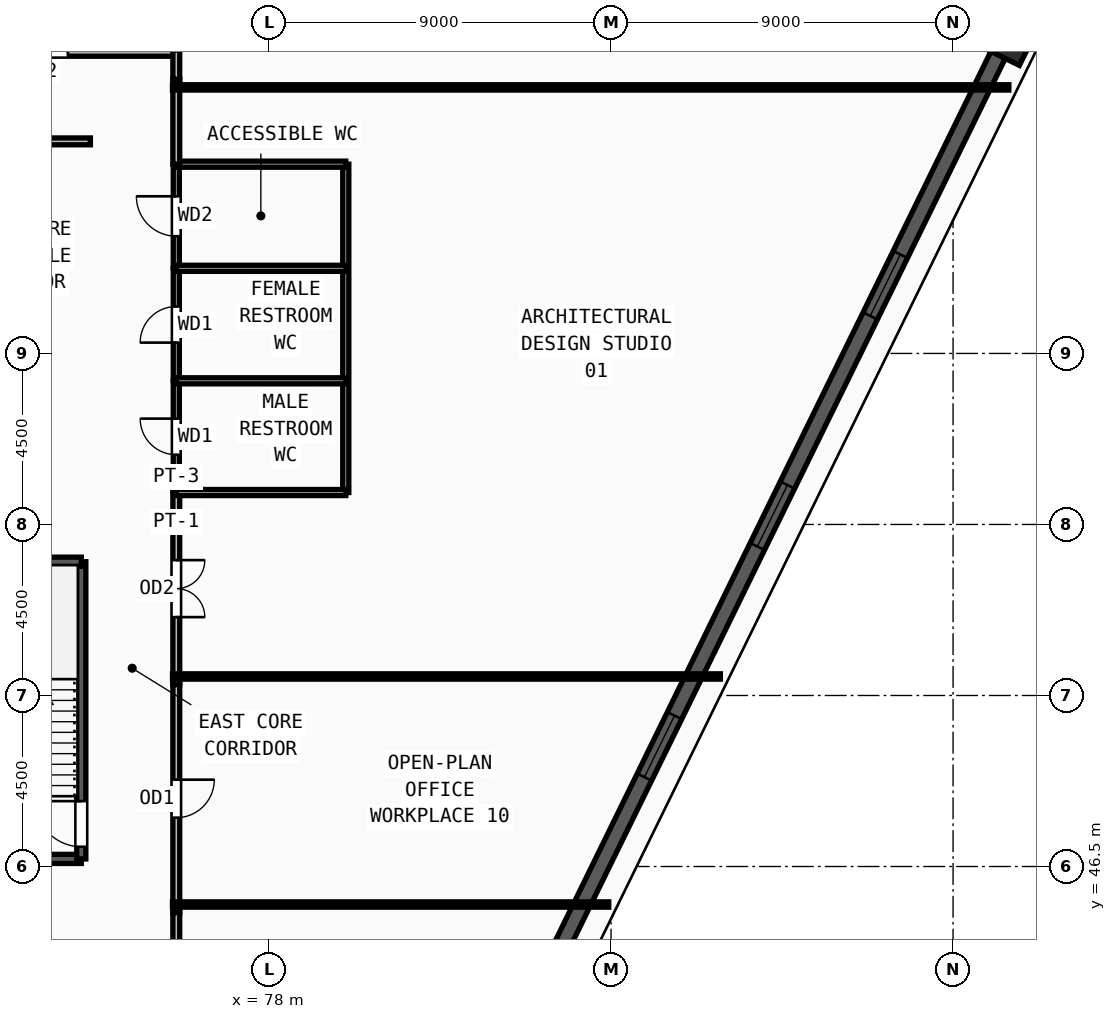
"""IFC4 building model, lengths in metres.
Left out: names, types, materials, properties, quantities, classifications, styles, units other than length and angle.
Written with IfcOpenShell. Run it as: python <this file> out.ifc"""

import sys

from ifc_helpers import new_model, si_unit, direction, frame, frame_2d, origin, origin_2d, place, context, subcontext, project, spatial, rectangle, extrude, source, transform, mapped, element, fill, save


model = new_model("IFC4")
c1 = context("Model", 3, precision=1e-05, world=origin(), true_north=direction((0.0, 1.0)))
c2 = subcontext(c1, "Body", "Model", "MODEL_VIEW")
j1 = project(units=[si_unit("LENGTHUNIT", "METRE"), si_unit("PLANEANGLEUNIT", "RADIAN")], contexts=[c1])
p1 = place(None, origin())
s1 = spatial("IfcSite", under=j1, at=p1, CompositionType="ELEMENT")
p2 = place(p1, origin())
s2 = spatial("IfcBuilding", under=s1, at=p2, CompositionType="ELEMENT")
p3 = place(p2, frame((0.0, 0.0, 85.5)))
s3 = spatial("IfcBuildingStorey", under=s2, at=p3, CompositionType="ELEMENT", Elevation=85.5)
m1 = source(origin(), c2, "Body", "SweptSolid", [
    extrude(rectangle(XDim=1.55, YDim=1.25, at=origin_2d()), origin(), (0.0, 0.0, 1.0), 3.75),
])
p4 = place(p3, frame((97.525, 68.55, 0.0), z_axis=(0.0, 0.0, 1.0), x_axis=(0.439782427776, 0.898104345953, 0.0)))
e1 = element("IfcColumn", 1, at=p4, inside=s3, PredefinedType="COLUMN", context=c2, shape_type="MappedRepresentation", body=[
    mapped(m1, transform((0.0, 0.0, 0.0), x_axis=(1.0, 0.0, 0.0), y_axis=(0.0, 1.0, 0.0), z_axis=(0.0, 0.0, 1.0), scale=1.0)),
])
p5 = place(p3, frame((85.303, 43.594, 0.0), z_axis=(0.0, 0.0, 1.0), x_axis=(0.43984083091, 0.898075744837, 0.0)))
e2 = element("IfcWall", 2, at=p5, inside=s3, PredefinedType="SOLIDWALL", context=c2, shape_type="SweptSolid", body=[
    extrude(rectangle(XDim=27.023, YDim=0.42, at=frame_2d((13.512, 0.0))), origin(), (0.0, 0.0, 1.0), 3.57),
])
m2 = source(origin(), c2, "Body", "SweptSolid", [
    extrude(rectangle(XDim=1.8, YDim=1.95, at=frame_2d((0.9, 0.975))), frame((0.0, 0.22, 0.0), z_axis=(0.0, -1.0, 0.0), x_axis=(1.0, 0.0, 0.0)), (0.0, 0.0, 1.0), 0.44),
])
p6 = place(p5, frame((5.856, 0.0, 0.55)))
e3 = element("IfcOpeningElement", 3, at=p6, cuts=e2, PredefinedType="OPENING", context=c2, shape_type="MappedRepresentation", body=[
    mapped(m2, transform((0.0, 0.0, 0.0), x_axis=(1.0, 0.0, 0.0), y_axis=(0.0, 1.0, 0.0), z_axis=(0.0, 0.0, 1.0), scale=1.0)),
])
p7 = place(p5, frame((12.612, 0.0, 0.55)))
e4 = element("IfcOpeningElement", 4, at=p7, cuts=e2, PredefinedType="OPENING", context=c2, shape_type="MappedRepresentation", body=[
    mapped(m2, transform((0.0, 0.0, 0.0), x_axis=(1.0, 0.0, 0.0), y_axis=(0.0, 1.0, 0.0), z_axis=(0.0, 0.0, 1.0), scale=1.0)),
])
p8 = place(p5, frame((19.368, 0.0, 0.55)))
e5 = element("IfcOpeningElement", 5, at=p8, cuts=e2, PredefinedType="OPENING", context=c2, shape_type="MappedRepresentation", body=[
    mapped(m2, transform((0.0, 0.0, 0.0), x_axis=(1.0, 0.0, 0.0), y_axis=(0.0, 1.0, 0.0), z_axis=(0.0, 0.0, 1.0), scale=1.0)),
])
p9 = place(p3, frame((69.62, 46.7, 0.0), z_axis=(0.0, 0.0, 1.0), x_axis=(1.0, 0.0, 0.0)))
e6 = element("IfcWall", 6, at=p9, inside=s3, PredefinedType="SOLIDWALL", context=c2, shape_type="SweptSolid", body=[
    extrude(rectangle(XDim=3.44, YDim=0.24, at=frame_2d((1.72, 0.0))), origin(), (0.0, 0.0, 1.0), 3.57),
])
p10 = place(p3, frame((73.06, 46.7, 0.0), z_axis=(0.0, 0.0, 1.0), x_axis=(0.0, 1.0, 0.0)))
e7 = element("IfcWall", 7, at=p10, inside=s3, PredefinedType="SOLIDWALL", context=c2, shape_type="SweptSolid", body=[
    extrude(rectangle(XDim=7.82, YDim=0.24, at=frame_2d((3.91, 0.0))), origin(), (0.0, 0.0, 1.0), 3.57),
])
m3 = source(origin(), c2, "Body", "SweptSolid", [
    extrude(rectangle(XDim=1.2, YDim=2.2, at=frame_2d((0.6, 1.1))), frame((0.0, 0.13, 0.0), z_axis=(0.0, -1.0, 0.0), x_axis=(1.0, 0.0, 0.0)), (0.0, 0.0, 1.0), 0.26),
])
p11 = place(p10, frame((0.32, 0.0, 0.0)))
e8 = element("IfcOpeningElement", 8, at=p11, cuts=e7, PredefinedType="OPENING", context=c2, shape_type="MappedRepresentation", body=[
    mapped(m3, transform((0.0, 0.0, 0.0), x_axis=(1.0, 0.0, 0.0), y_axis=(0.0, 1.0, 0.0), z_axis=(0.0, 0.0, 1.0), scale=1.0)),
])
p12 = place(p3, frame((73.06, 54.52, 0.0), z_axis=(0.0, 0.0, 1.0), x_axis=(-1.0, 0.0, 0.0)))
e9 = element("IfcWall", 9, at=p12, inside=s3, PredefinedType="SOLIDWALL", context=c2, shape_type="SweptSolid", body=[
    extrude(rectangle(XDim=3.44, YDim=0.24, at=frame_2d((1.72, 0.0))), origin(), (0.0, 0.0, 1.0), 3.57),
])
p13 = place(p3, frame((75.56, 56.34, 0.0), z_axis=(0.0, 0.0, 1.0), x_axis=(0.0, 1.0, 0.0)))
e10 = element("IfcWall", 10, at=p13, inside=s3, PredefinedType="PARTITIONING", context=c2, shape_type="SweptSolid", body=[
    extrude(rectangle(XDim=2.94, YDim=0.16, at=frame_2d((1.47, 0.0))), origin(), (0.0, 0.0, 1.0), 3.57),
])
m4 = source(origin(), c2, "Body", "SweptSolid", [
    extrude(rectangle(XDim=0.95, YDim=2.15, at=frame_2d((0.475, 1.075))), frame((0.0, 0.09, 0.0), z_axis=(0.0, -1.0, 0.0), x_axis=(1.0, 0.0, 0.0)), (0.0, 0.0, 1.0), 0.18),
])
p14 = place(p13, frame((0.995, 0.0, 0.0)))
e11 = element("IfcOpeningElement", 11, at=p14, cuts=e10, PredefinedType="OPENING", context=c2, shape_type="MappedRepresentation", body=[
    mapped(m4, transform((0.0, 0.0, 0.0), x_axis=(1.0, 0.0, 0.0), y_axis=(0.0, 1.0, 0.0), z_axis=(0.0, 0.0, 1.0), scale=1.0)),
])
p15 = place(p3, frame((75.56, 59.28, 0.0), z_axis=(0.0, 0.0, 1.0), x_axis=(0.0, 1.0, 0.0)))
e12 = element("IfcWall", 12, at=p15, inside=s3, PredefinedType="PARTITIONING", context=c2, shape_type="SweptSolid", body=[
    extrude(rectangle(XDim=2.96, YDim=0.16, at=frame_2d((1.48, 0.0))), origin(), (0.0, 0.0, 1.0), 3.57),
])
p16 = place(p15, frame((1.005, 0.0, 0.0)))
e13 = element("IfcOpeningElement", 13, at=p16, cuts=e12, PredefinedType="OPENING", context=c2, shape_type="MappedRepresentation", body=[
    mapped(m4, transform((0.0, 0.0, 0.0), x_axis=(1.0, 0.0, 0.0), y_axis=(0.0, 1.0, 0.0), z_axis=(0.0, 0.0, 1.0), scale=1.0)),
])
p17 = place(p3, frame((75.56, 62.24, 0.0), z_axis=(0.0, 0.0, 1.0), x_axis=(0.0, 1.0, 0.0)))
e14 = element("IfcWall", 14, at=p17, inside=s3, PredefinedType="PARTITIONING", context=c2, shape_type="SweptSolid", body=[
    extrude(rectangle(XDim=2.74, YDim=0.16, at=frame_2d((1.37, 0.0))), origin(), (0.0, 0.0, 1.0), 3.57),
])
m5 = source(origin(), c2, "Body", "SweptSolid", [
    extrude(rectangle(XDim=1.05, YDim=2.15, at=frame_2d((0.525, 1.075))), frame((0.0, 0.09, 0.0), z_axis=(0.0, -1.0, 0.0), x_axis=(1.0, 0.0, 0.0)), (0.0, 0.0, 1.0), 0.18),
])
p18 = place(p17, frame((0.845, 0.0, 0.0)))
e15 = element("IfcOpeningElement", 15, at=p18, cuts=e14, PredefinedType="OPENING", context=c2, shape_type="MappedRepresentation", body=[
    mapped(m5, transform((0.0, 0.0, 0.0), x_axis=(1.0, 0.0, 0.0), y_axis=(0.0, 1.0, 0.0), z_axis=(0.0, 0.0, 1.0), scale=1.0)),
])
p19 = place(p3, frame((69.46, 65.58, 0.0), z_axis=(0.0, 0.0, 1.0), x_axis=(1.0, 0.0, 0.0)))
e16 = element("IfcWall", 16, at=p19, inside=s3, PredefinedType="PARTITIONING", context=c2, shape_type="SweptSolid", body=[
    extrude(rectangle(XDim=3.84, YDim=0.18, at=frame_2d((1.92, 0.0))), origin(), (0.0, 0.0, 1.0), 3.57),
])
m6 = source(origin(), c2, "Body", "SweptSolid", [
    extrude(rectangle(XDim=1.3, YDim=2.2, at=frame_2d((0.65, 1.1))), frame((0.0, 0.1, 0.0), z_axis=(0.0, -1.0, 0.0), x_axis=(1.0, 0.0, 0.0)), (0.0, 0.0, 1.0), 0.2),
])
p20 = place(p19, frame((1.27, 0.0, 0.0)))
e17 = element("IfcOpeningElement", 17, at=p20, cuts=e16, PredefinedType="OPENING", context=c2, shape_type="MappedRepresentation", body=[
    mapped(m6, transform((0.0, 0.0, 0.0), x_axis=(1.0, 0.0, 0.0), y_axis=(0.0, 1.0, 0.0), z_axis=(0.0, 0.0, 1.0), scale=1.0)),
])
p21 = place(p3, frame((75.56, 56.34, 0.0), z_axis=(0.0, 0.0, 1.0), x_axis=(0.0, -1.0, 0.0)))
e18 = element("IfcWall", 18, at=p21, inside=s3, PredefinedType="PARTITIONING", context=c2, shape_type="SweptSolid", body=[
    extrude(rectangle(XDim=5.055, YDim=0.18, at=frame_2d((2.528, 0.0))), origin(), (0.0, 0.0, 1.0), 3.57),
])
m7 = source(origin(), c2, "Body", "SweptSolid", [
    extrude(rectangle(XDim=1.5, YDim=2.2, at=frame_2d((0.75, 1.1))), frame((0.0, 0.1, 0.0), z_axis=(0.0, -1.0, 0.0), x_axis=(1.0, 0.0, 0.0)), (0.0, 0.0, 1.0), 0.2),
])
p22 = place(p21, frame((1.778, 0.0, 0.0)))
e19 = element("IfcOpeningElement", 19, at=p22, cuts=e18, PredefinedType="OPENING", context=c2, shape_type="MappedRepresentation", body=[
    mapped(m7, transform((0.0, 0.0, 0.0), x_axis=(1.0, 0.0, 0.0), y_axis=(0.0, 1.0, 0.0), z_axis=(0.0, 0.0, 1.0), scale=1.0)),
])
p23 = place(p3, frame((68.285, 67.91, 0.0), z_axis=(0.0, 0.0, 1.0), x_axis=(1.0, 0.0, 0.0)))
e20 = element("IfcWall", 20, at=p23, inside=s3, PredefinedType="PARTITIONING", context=c2, shape_type="SweptSolid", body=[
    extrude(rectangle(XDim=7.345, YDim=0.18, at=frame_2d((3.672, 0.0))), origin(), (0.0, 0.0, 1.0), 3.57),
])
p24 = place(p23, frame((2.922, 0.0, 0.0)))
e21 = element("IfcOpeningElement", 21, at=p24, cuts=e20, PredefinedType="OPENING", context=c2, shape_type="MappedRepresentation", body=[
    mapped(m7, transform((0.0, 0.0, 0.0), x_axis=(1.0, 0.0, 0.0), y_axis=(0.0, 1.0, 0.0), z_axis=(0.0, 0.0, 1.0), scale=1.0)),
])
p25 = place(p3, frame((75.56, 51.285, 0.0), z_axis=(0.0, 0.0, 1.0), x_axis=(0.0, -1.0, 0.0)))
e22 = element("IfcWall", 22, at=p25, inside=s3, PredefinedType="PARTITIONING", context=c2, shape_type="SweptSolid", body=[
    extrude(rectangle(XDim=6.0, YDim=0.18, at=frame_2d((3.0, 0.0))), origin(), (0.0, 0.0, 1.0), 3.57),
])
m8 = source(origin(), c2, "Body", "SweptSolid", [
    extrude(rectangle(XDim=1.0, YDim=2.2, at=frame_2d((0.5, 1.1))), frame((0.0, 0.1, 0.0), z_axis=(0.0, -1.0, 0.0), x_axis=(1.0, 0.0, 0.0)), (0.0, 0.0, 1.0), 0.2),
])
p26 = place(p25, frame((2.5, 0.0, 0.0)))
e23 = element("IfcOpeningElement", 23, at=p26, cuts=e22, PredefinedType="OPENING", context=c2, shape_type="MappedRepresentation", body=[
    mapped(m8, transform((0.0, 0.0, 0.0), x_axis=(1.0, 0.0, 0.0), y_axis=(0.0, 1.0, 0.0), z_axis=(0.0, 0.0, 1.0), scale=1.0)),
])
p27 = place(p3, frame((80.02, 56.34, 0.0), z_axis=(0.0, 0.0, 1.0), x_axis=(0.0, 1.0, 0.0)))
e24 = element("IfcWall", 24, at=p27, inside=s3, PredefinedType="PARTITIONING", context=c2, shape_type="SweptSolid", body=[
    extrude(rectangle(XDim=8.64, YDim=0.16, at=frame_2d((4.32, 0.0))), origin(), (0.0, 0.0, 1.0), 3.57),
])
for number, where, z_axis, x_axis in (
    (25, (75.56, 56.34, 0.0), (0.0, 0.0, 1.0), (1.0, 0.0, 0.0)),
    (26, (75.56, 59.28, 0.0), (0.0, 0.0, 1.0), (1.0, 0.0, 0.0)),
    (27, (75.56, 62.24, 0.0), (0.0, 0.0, 1.0), (1.0, 0.0, 0.0)),
    (28, (75.56, 64.98, 0.0), (0.0, 0.0, 1.0), (1.0, 0.0, 0.0)),
):
    element("IfcWall", number, at=place(p3, frame(where, z_axis=z_axis, x_axis=x_axis)), inside=s3, PredefinedType="PARTITIONING", context=c2, shape_type="SweptSolid", body=[
        extrude(rectangle(XDim=4.46, YDim=0.16, at=frame_2d((2.23, 0.0))), origin(), (0.0, 0.0, 1.0), 3.57),
    ])
p28 = place(p3, frame((75.56, 67.215, 0.0), z_axis=(0.0, 0.0, 1.0), x_axis=(0.0, -1.0, 0.0)))
e29 = element("IfcWall", 29, at=p28, inside=s3, PredefinedType="PARTITIONING", context=c2, shape_type="SweptSolid", body=[
    extrude(rectangle(XDim=2.235, YDim=0.18, at=frame_2d((1.118, 0.0))), origin(), (0.0, 0.0, 1.0), 3.57),
])
p29 = place(p3, frame((75.56, 67.98, 0.0), z_axis=(0.0, 0.0, 1.0), x_axis=(0.0, -1.0, 0.0)))
e30 = element("IfcWall", 30, at=p29, inside=s3, PredefinedType="PARTITIONING", context=c2, shape_type="SweptSolid", body=[
    extrude(rectangle(XDim=0.765, YDim=0.18, at=frame_2d((0.382, 0.0))), origin(), (0.0, 0.0, 1.0), 3.57),
])
p30 = place(p3, frame((75.56, 45.285, 0.0), z_axis=(0.0, 0.0, 1.0), x_axis=(0.0, -1.0, 0.0)))
e31 = element("IfcWall", 31, at=p30, inside=s3, PredefinedType="PARTITIONING", context=c2, shape_type="SweptSolid", body=[
    extrude(rectangle(XDim=1.615, YDim=0.18, at=frame_2d((0.808, 0.0))), origin(), (0.0, 0.0, 1.0), 3.57),
])
p31 = place(p3, frame((75.46, 45.5, 0.0), z_axis=(0.0, 0.0, 1.0), x_axis=(1.0, 0.0, 0.0)))
e32 = element("IfcWall", 32, at=p31, inside=s3, PredefinedType="PARTITIONING", context=c2, shape_type="SweptSolid", body=[
    extrude(rectangle(XDim=11.479, YDim=0.14, at=frame_2d((5.74, 0.0))), origin(), (0.0, 0.0, 1.0), 3.57),
])
p32 = place(p3, frame((75.46, 51.5, 0.0), z_axis=(0.0, 0.0, 1.0), x_axis=(1.0, 0.0, 0.0)))
e33 = element("IfcWall", 33, at=p32, inside=s3, PredefinedType="PARTITIONING", context=c2, shape_type="SweptSolid", body=[
    extrude(rectangle(XDim=14.417, YDim=0.14, at=frame_2d((7.208, 0.0))), origin(), (0.0, 0.0, 1.0), 3.57),
])
p33 = place(p3, frame((75.46, 67.0, 0.0), z_axis=(0.0, 0.0, 1.0), x_axis=(1.0, 0.0, 0.0)))
e34 = element("IfcWall", 34, at=p33, inside=s3, PredefinedType="PARTITIONING", context=c2, shape_type="SweptSolid", body=[
    extrude(rectangle(XDim=22.008, YDim=0.14, at=frame_2d((11.004, 0.0))), origin(), (0.0, 0.0, 1.0), 2.655),
])
m9 = source(origin(), c2, "Body", "SweptSolid", [
    extrude(rectangle(XDim=1.8, YDim=1.95, at=frame_2d((0.9, 0.975))), frame((0.0, 0.03, 0.0), z_axis=(0.0, -1.0, 0.0), x_axis=(1.0, 0.0, 0.0)), (0.0, 0.0, 1.0), 0.06),
])
p34 = place(p6, origin())
e35 = element("IfcWindow", 35, at=p34, inside=s3, PartitioningType="DOUBLE_PANEL_VERTICAL", PredefinedType="WINDOW", context=c2, shape_type="MappedRepresentation", body=[
    mapped(m9, transform((0.0, 0.0, 0.0), x_axis=(1.0, 0.0, 0.0), y_axis=(0.0, 1.0, 0.0), z_axis=(0.0, 0.0, 1.0), scale=1.0)),
])
fill(e3, e35)
p35 = place(p7, origin())
e36 = element("IfcWindow", 36, at=p35, inside=s3, PartitioningType="DOUBLE_PANEL_VERTICAL", PredefinedType="WINDOW", context=c2, shape_type="MappedRepresentation", body=[
    mapped(m9, transform((0.0, 0.0, 0.0), x_axis=(1.0, 0.0, 0.0), y_axis=(0.0, 1.0, 0.0), z_axis=(0.0, 0.0, 1.0), scale=1.0)),
])
fill(e4, e36)
p36 = place(p8, origin())
e37 = element("IfcWindow", 37, at=p36, inside=s3, PartitioningType="DOUBLE_PANEL_VERTICAL", PredefinedType="WINDOW", context=c2, shape_type="MappedRepresentation", body=[
    mapped(m9, transform((0.0, 0.0, 0.0), x_axis=(1.0, 0.0, 0.0), y_axis=(0.0, 1.0, 0.0), z_axis=(0.0, 0.0, 1.0), scale=1.0)),
])
fill(e5, e37)
m10 = source(origin(), c2, "Body", "SweptSolid", [
    extrude(rectangle(XDim=1.2, YDim=2.2, at=frame_2d((0.6, 1.1))), frame((0.0, 0.025, 0.0), z_axis=(0.0, -1.0, 0.0), x_axis=(1.0, 0.0, 0.0)), (0.0, 0.0, 1.0), 0.05),
])
p37 = place(p11, origin())
e38 = element("IfcDoor", 38, at=p37, inside=s3, OperationType="SINGLE_SWING_RIGHT", PredefinedType="DOOR", context=c2, shape_type="MappedRepresentation", body=[
    mapped(m10, transform((0.0, 0.0, 0.0), x_axis=(1.0, 0.0, 0.0), y_axis=(0.0, 1.0, 0.0), z_axis=(0.0, 0.0, 1.0), scale=1.0)),
])
fill(e8, e38)
m11 = source(origin(), c2, "Body", "SweptSolid", [
    extrude(rectangle(XDim=0.95, YDim=2.15, at=frame_2d((0.475, 1.075))), frame((0.0, 0.025, 0.0), z_axis=(0.0, -1.0, 0.0), x_axis=(1.0, 0.0, 0.0)), (0.0, 0.0, 1.0), 0.05),
])
p38 = place(p14, origin())
e39 = element("IfcDoor", 39, at=p38, inside=s3, OperationType="SINGLE_SWING_RIGHT", PredefinedType="DOOR", context=c2, shape_type="MappedRepresentation", body=[
    mapped(m11, transform((0.0, 0.0, 0.0), x_axis=(1.0, 0.0, 0.0), y_axis=(0.0, 1.0, 0.0), z_axis=(0.0, 0.0, 1.0), scale=1.0)),
])
fill(e11, e39)
p39 = place(p16, origin())
e40 = element("IfcDoor", 40, at=p39, inside=s3, OperationType="SINGLE_SWING_LEFT", PredefinedType="DOOR", context=c2, shape_type="MappedRepresentation", body=[
    mapped(m11, transform((0.0, 0.0, 0.0), x_axis=(1.0, 0.0, 0.0), y_axis=(0.0, 1.0, 0.0), z_axis=(0.0, 0.0, 1.0), scale=1.0)),
])
fill(e13, e40)
m12 = source(origin(), c2, "Body", "SweptSolid", [
    extrude(rectangle(XDim=1.05, YDim=2.15, at=frame_2d((0.525, 1.075))), frame((0.0, 0.025, 0.0), z_axis=(0.0, -1.0, 0.0), x_axis=(1.0, 0.0, 0.0)), (0.0, 0.0, 1.0), 0.05),
])
p40 = place(p18, origin())
e41 = element("IfcDoor", 41, at=p40, inside=s3, OperationType="SINGLE_SWING_RIGHT", PredefinedType="DOOR", context=c2, shape_type="MappedRepresentation", body=[
    mapped(m12, transform((0.0, 0.0, 0.0), x_axis=(1.0, 0.0, 0.0), y_axis=(0.0, 1.0, 0.0), z_axis=(0.0, 0.0, 1.0), scale=1.0)),
])
fill(e15, e41)
m13 = source(origin(), c2, "Body", "SweptSolid", [
    extrude(rectangle(XDim=1.5, YDim=2.2, at=frame_2d((0.75, 1.1))), frame((0.0, 0.025, 0.0), z_axis=(0.0, -1.0, 0.0), x_axis=(1.0, 0.0, 0.0)), (0.0, 0.0, 1.0), 0.05),
])
p41 = place(p22, origin())
e42 = element("IfcDoor", 42, at=p41, inside=s3, OperationType="DOUBLE_DOOR_SINGLE_SWING", PredefinedType="DOOR", context=c2, shape_type="MappedRepresentation", body=[
    mapped(m13, transform((0.0, 0.0, 0.0), x_axis=(1.0, 0.0, 0.0), y_axis=(0.0, 1.0, 0.0), z_axis=(0.0, 0.0, 1.0), scale=1.0)),
])
fill(e19, e42)
p42 = place(p24, origin())
e43 = element("IfcDoor", 43, at=p42, inside=s3, OperationType="DOUBLE_DOOR_SINGLE_SWING", PredefinedType="DOOR", context=c2, shape_type="MappedRepresentation", body=[
    mapped(m13, transform((0.0, 0.0, 0.0), x_axis=(1.0, 0.0, 0.0), y_axis=(0.0, 1.0, 0.0), z_axis=(0.0, 0.0, 1.0), scale=1.0)),
])
fill(e21, e43)
m14 = source(origin(), c2, "Body", "SweptSolid", [
    extrude(rectangle(XDim=1.0, YDim=2.2, at=frame_2d((0.5, 1.1))), frame((0.0, 0.025, 0.0), z_axis=(0.0, -1.0, 0.0), x_axis=(1.0, 0.0, 0.0)), (0.0, 0.0, 1.0), 0.05),
])
p43 = place(p26, origin())
e44 = element("IfcDoor", 44, at=p43, inside=s3, OperationType="SINGLE_SWING_LEFT", PredefinedType="DOOR", context=c2, shape_type="MappedRepresentation", body=[
    mapped(m14, transform((0.0, 0.0, 0.0), x_axis=(1.0, 0.0, 0.0), y_axis=(0.0, 1.0, 0.0), z_axis=(0.0, 0.0, 1.0), scale=1.0)),
])
fill(e23, e44)
save(model, sys.argv[1])
